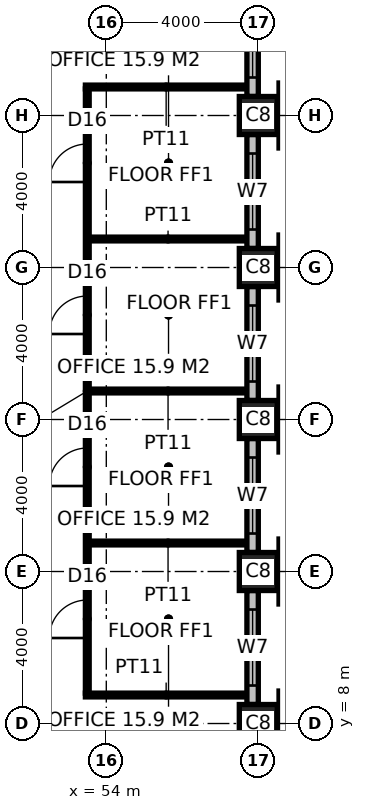
"""IFC4 building model, lengths in metres.
Left out: names, types, materials, properties, quantities, classifications, styles, units other than length and angle.
Written with IfcOpenShell. Run it as: python <this file> out.ifc"""

import sys

from ifc_helpers import new_model, si_unit, direction, frame, frame_2d, origin, origin_2d, place, context, subcontext, project, spatial, rectangle, hollow_rectangle, extrude, element, fill, save


model = new_model("IFC4")
c1 = context("Model", 3, precision=1e-05, world=origin(), true_north=direction((0.0, 1.0)))
c2 = subcontext(c1, "Body", "Model", "MODEL_VIEW")
j1 = project(units=[si_unit("LENGTHUNIT", "METRE"), si_unit("PLANEANGLEUNIT", "RADIAN")], contexts=[c1])
p1 = place(None, origin())
s1 = spatial("IfcSite", under=j1, at=p1, CompositionType="ELEMENT")
p2 = place(p1, origin())
s2 = spatial("IfcBuilding", under=s1, at=p2, CompositionType="ELEMENT")
p3 = place(p2, frame((0.0, 0.0, 133.4)))
s3 = spatial("IfcBuildingStorey", under=s2, at=p3, CompositionType="ELEMENT", Elevation=133.4)
for number, where, z_axis, x_axis in (
    (1, (58.0, 8.0, 0.0), (0.0, 0.0, 1.0), (1.0, 0.0, 0.0)),
    (2, (58.0, 12.0, 0.0), (0.0, 0.0, 1.0), (1.0, 0.0, 0.0)),
    (3, (58.0, 16.0, 0.0), (0.0, 0.0, 1.0), (1.0, 0.0, 0.0)),
    (4, (58.0, 20.0, 0.0), (0.0, 0.0, 1.0), (1.0, 0.0, 0.0)),
    (5, (58.0, 24.0, 0.0), (0.0, 0.0, 1.0), (1.0, 0.0, 0.0)),
):
    element("IfcColumn", number, at=place(p3, frame(where, z_axis=z_axis, x_axis=x_axis)), inside=s3, PredefinedType="COLUMN", context=c2, shape_type="SweptSolid", body=[
        extrude(hollow_rectangle(XDim=1.0, YDim=1.0, WallThickness=0.125, at=origin_2d()), origin(), (0.0, 0.0, 1.0), 4.0),
    ])
p4 = place(p3, frame((53.45, 8.75, 0.0), z_axis=(0.0, 0.0, 1.0), x_axis=(1.0, 0.0, 0.0)))
e6 = element("IfcWall", 6, at=p4, inside=s3, PredefinedType="PARTITIONING", context=c2, shape_type="SweptSolid", body=[
    extrude(rectangle(XDim=4.25, YDim=0.1, at=frame_2d((2.125, 0.0))), origin(), (0.0, 0.0, 1.0), 3.85),
])
for number, where, z_axis, x_axis in (
    (7, (53.55, 12.75, 0.0), (0.0, 0.0, 1.0), (1.0, 0.0, 0.0)),
    (8, (53.55, 16.75, 0.0), (0.0, 0.0, 1.0), (1.0, 0.0, 0.0)),
    (9, (53.55, 20.75, 0.0), (0.0, 0.0, 1.0), (1.0, 0.0, 0.0)),
):
    element("IfcWall", number, at=place(p3, frame(where, z_axis=z_axis, x_axis=x_axis)), inside=s3, PredefinedType="PARTITIONING", context=c2, shape_type="SweptSolid", body=[
        extrude(rectangle(XDim=4.15, YDim=0.1, at=frame_2d((2.075, 0.0))), origin(), (0.0, 0.0, 1.0), 3.85),
    ])
p5 = place(p3, frame((53.45, 24.75, 0.0), z_axis=(0.0, 0.0, 1.0), x_axis=(1.0, 0.0, 0.0)))
e10 = element("IfcWall", 10, at=p5, inside=s3, PredefinedType="PARTITIONING", context=c2, shape_type="SweptSolid", body=[
    extrude(rectangle(XDim=4.25, YDim=0.1, at=frame_2d((2.125, 0.0))), origin(), (0.0, 0.0, 1.0), 3.85),
])
p6 = place(p3, frame((53.5, 8.8, 0.0), z_axis=(0.0, 0.0, 1.0), x_axis=(0.0, 1.0, 0.0)))
e11 = element("IfcWall", 11, at=p6, inside=s3, PredefinedType="PARTITIONING", context=c2, shape_type="SweptSolid", body=[
    extrude(rectangle(XDim=15.9, YDim=0.1, at=frame_2d((7.95, 0.0))), origin(), (0.0, 0.0, 1.0), 3.85),
])
p7 = place(p6, frame((1.45, 0.0, 0.0)))
e12 = element("IfcOpeningElement", 12, at=p7, cuts=e11, PredefinedType="OPENING", context=c2, shape_type="SweptSolid", body=[
    extrude(rectangle(XDim=1.0, YDim=2.2, at=frame_2d((0.5, 1.1))), frame((0.0, 0.06, 0.0), z_axis=(0.0, -1.0, 0.0), x_axis=(1.0, 0.0, 0.0)), (0.0, 0.0, 1.0), 0.12),
])
p8 = place(p6, frame((5.45, 0.0, 0.0)))
e13 = element("IfcOpeningElement", 13, at=p8, cuts=e11, PredefinedType="OPENING", context=c2, shape_type="SweptSolid", body=[
    extrude(rectangle(XDim=1.0, YDim=2.2, at=frame_2d((0.5, 1.1))), frame((0.0, 0.06, 0.0), z_axis=(0.0, -1.0, 0.0), x_axis=(1.0, 0.0, 0.0)), (0.0, 0.0, 1.0), 0.12),
])
p9 = place(p6, frame((9.45, 0.0, 0.0)))
e14 = element("IfcOpeningElement", 14, at=p9, cuts=e11, PredefinedType="OPENING", context=c2, shape_type="SweptSolid", body=[
    extrude(rectangle(XDim=1.0, YDim=2.2, at=frame_2d((0.5, 1.1))), frame((0.0, 0.06, 0.0), z_axis=(0.0, -1.0, 0.0), x_axis=(1.0, 0.0, 0.0)), (0.0, 0.0, 1.0), 0.12),
])
p10 = place(p6, frame((13.45, 0.0, 0.0)))
e15 = element("IfcOpeningElement", 15, at=p10, cuts=e11, PredefinedType="OPENING", context=c2, shape_type="SweptSolid", body=[
    extrude(rectangle(XDim=1.0, YDim=2.2, at=frame_2d((0.5, 1.1))), frame((0.0, 0.06, 0.0), z_axis=(0.0, -1.0, 0.0), x_axis=(1.0, 0.0, 0.0)), (0.0, 0.0, 1.0), 0.12),
])
p11 = place(p3, frame((57.85, 8.5, 0.0), z_axis=(0.0, 0.0, 1.0), x_axis=(0.0, 1.0, 0.0)))
e16 = element("IfcWall", 16, at=p11, inside=s3, PredefinedType="ELEMENTEDWALL", context=c2, shape_type="SweptSolid", body=[
    extrude(rectangle(XDim=3.0, YDim=0.3, at=frame_2d((1.5, 0.0))), origin(), (0.0, 0.0, 1.0), 2.65),
])
p12 = place(p11, frame((0.5, 0.0, 0.8)))
e17 = element("IfcOpeningElement", 17, at=p12, cuts=e16, PredefinedType="OPENING", context=c2, shape_type="SweptSolid", body=[
    extrude(rectangle(XDim=2.0, YDim=1.8, at=frame_2d((1.0, 0.9))), frame((0.0, 0.16, 0.0), z_axis=(0.0, -1.0, 0.0), x_axis=(1.0, 0.0, 0.0)), (0.0, 0.0, 1.0), 0.32),
])
p13 = place(p3, frame((57.85, 12.5, 0.0), z_axis=(0.0, 0.0, 1.0), x_axis=(0.0, 1.0, 0.0)))
e18 = element("IfcWall", 18, at=p13, inside=s3, PredefinedType="ELEMENTEDWALL", context=c2, shape_type="SweptSolid", body=[
    extrude(rectangle(XDim=3.0, YDim=0.3, at=frame_2d((1.5, 0.0))), origin(), (0.0, 0.0, 1.0), 2.65),
])
p14 = place(p13, frame((0.5, 0.0, 0.8)))
e19 = element("IfcOpeningElement", 19, at=p14, cuts=e18, PredefinedType="OPENING", context=c2, shape_type="SweptSolid", body=[
    extrude(rectangle(XDim=2.0, YDim=1.8, at=frame_2d((1.0, 0.9))), frame((0.0, 0.16, 0.0), z_axis=(0.0, -1.0, 0.0), x_axis=(1.0, 0.0, 0.0)), (0.0, 0.0, 1.0), 0.32),
])
p15 = place(p3, frame((57.85, 16.5, 0.0), z_axis=(0.0, 0.0, 1.0), x_axis=(0.0, 1.0, 0.0)))
e20 = element("IfcWall", 20, at=p15, inside=s3, PredefinedType="ELEMENTEDWALL", context=c2, shape_type="SweptSolid", body=[
    extrude(rectangle(XDim=3.0, YDim=0.3, at=frame_2d((1.5, 0.0))), origin(), (0.0, 0.0, 1.0), 2.65),
])
p16 = place(p15, frame((0.5, 0.0, 0.8)))
e21 = element("IfcOpeningElement", 21, at=p16, cuts=e20, PredefinedType="OPENING", context=c2, shape_type="SweptSolid", body=[
    extrude(rectangle(XDim=2.0, YDim=1.8, at=frame_2d((1.0, 0.9))), frame((0.0, 0.16, 0.0), z_axis=(0.0, -1.0, 0.0), x_axis=(1.0, 0.0, 0.0)), (0.0, 0.0, 1.0), 0.32),
])
p17 = place(p3, frame((57.85, 20.5, 0.0), z_axis=(0.0, 0.0, 1.0), x_axis=(0.0, 1.0, 0.0)))
e22 = element("IfcWall", 22, at=p17, inside=s3, PredefinedType="ELEMENTEDWALL", context=c2, shape_type="SweptSolid", body=[
    extrude(rectangle(XDim=3.0, YDim=0.3, at=frame_2d((1.5, 0.0))), origin(), (0.0, 0.0, 1.0), 2.65),
])
p18 = place(p17, frame((0.5, 0.0, 0.8)))
e23 = element("IfcOpeningElement", 23, at=p18, cuts=e22, PredefinedType="OPENING", context=c2, shape_type="SweptSolid", body=[
    extrude(rectangle(XDim=2.0, YDim=1.8, at=frame_2d((1.0, 0.9))), frame((0.0, 0.16, 0.0), z_axis=(0.0, -1.0, 0.0), x_axis=(1.0, 0.0, 0.0)), (0.0, 0.0, 1.0), 0.32),
])
p19 = place(p3, frame((57.85, 24.5, 0.0), z_axis=(0.0, 0.0, 1.0), x_axis=(0.0, 1.0, 0.0)))
e24 = element("IfcWall", 24, at=p19, inside=s3, PredefinedType="ELEMENTEDWALL", context=c2, shape_type="SweptSolid", body=[
    extrude(rectangle(XDim=3.0, YDim=0.3, at=frame_2d((1.5, 0.0))), origin(), (0.0, 0.0, 1.0), 2.65),
])
p20 = place(p19, frame((0.5, 0.0, 0.8)))
e25 = element("IfcOpeningElement", 25, at=p20, cuts=e24, PredefinedType="OPENING", context=c2, shape_type="SweptSolid", body=[
    extrude(rectangle(XDim=2.0, YDim=1.8, at=frame_2d((1.0, 0.9))), frame((0.0, 0.16, 0.0), z_axis=(0.0, -1.0, 0.0), x_axis=(1.0, 0.0, 0.0)), (0.0, 0.0, 1.0), 0.32),
])
p21 = place(p7, origin())
e26 = element("IfcDoor", 26, at=p21, inside=s3, OperationType="SINGLE_SWING_LEFT", PredefinedType="DOOR", context=c2, shape_type="SweptSolid", body=[
    extrude(rectangle(XDim=1.0, YDim=2.2, at=frame_2d((0.5, 1.1))), frame((0.0, 0.025, 0.0), z_axis=(0.0, -1.0, 0.0), x_axis=(1.0, 0.0, 0.0)), (0.0, 0.0, 1.0), 0.05),
])
fill(e12, e26)
p22 = place(p8, origin())
e27 = element("IfcDoor", 27, at=p22, inside=s3, OperationType="SINGLE_SWING_LEFT", PredefinedType="DOOR", context=c2, shape_type="SweptSolid", body=[
    extrude(rectangle(XDim=1.0, YDim=2.2, at=frame_2d((0.5, 1.1))), frame((0.0, 0.025, 0.0), z_axis=(0.0, -1.0, 0.0), x_axis=(1.0, 0.0, 0.0)), (0.0, 0.0, 1.0), 0.05),
])
fill(e13, e27)
p23 = place(p9, origin())
e28 = element("IfcDoor", 28, at=p23, inside=s3, OperationType="SINGLE_SWING_LEFT", PredefinedType="DOOR", context=c2, shape_type="SweptSolid", body=[
    extrude(rectangle(XDim=1.0, YDim=2.2, at=frame_2d((0.5, 1.1))), frame((0.0, 0.025, 0.0), z_axis=(0.0, -1.0, 0.0), x_axis=(1.0, 0.0, 0.0)), (0.0, 0.0, 1.0), 0.05),
])
fill(e14, e28)
p24 = place(p10, origin())
e29 = element("IfcDoor", 29, at=p24, inside=s3, OperationType="SINGLE_SWING_LEFT", PredefinedType="DOOR", context=c2, shape_type="SweptSolid", body=[
    extrude(rectangle(XDim=1.0, YDim=2.2, at=frame_2d((0.5, 1.1))), frame((0.0, 0.025, 0.0), z_axis=(0.0, -1.0, 0.0), x_axis=(1.0, 0.0, 0.0)), (0.0, 0.0, 1.0), 0.05),
])
fill(e15, e29)
p25 = place(p12, origin())
e30 = element("IfcWindow", 30, at=p25, inside=s3, PartitioningType="SINGLE_PANEL", PredefinedType="WINDOW", context=c2, shape_type="SweptSolid", body=[
    extrude(rectangle(XDim=2.0, YDim=1.8, at=frame_2d((1.0, 0.9))), frame((0.0, 0.03, 0.0), z_axis=(0.0, -1.0, 0.0), x_axis=(1.0, 0.0, 0.0)), (0.0, 0.0, 1.0), 0.06),
])
fill(e17, e30)
p26 = place(p14, origin())
e31 = element("IfcWindow", 31, at=p26, inside=s3, PartitioningType="SINGLE_PANEL", PredefinedType="WINDOW", context=c2, shape_type="SweptSolid", body=[
    extrude(rectangle(XDim=2.0, YDim=1.8, at=frame_2d((1.0, 0.9))), frame((0.0, 0.03, 0.0), z_axis=(0.0, -1.0, 0.0), x_axis=(1.0, 0.0, 0.0)), (0.0, 0.0, 1.0), 0.06),
])
fill(e19, e31)
p27 = place(p16, origin())
e32 = element("IfcWindow", 32, at=p27, inside=s3, PartitioningType="SINGLE_PANEL", PredefinedType="WINDOW", context=c2, shape_type="SweptSolid", body=[
    extrude(rectangle(XDim=2.0, YDim=1.8, at=frame_2d((1.0, 0.9))), frame((0.0, 0.03, 0.0), z_axis=(0.0, -1.0, 0.0), x_axis=(1.0, 0.0, 0.0)), (0.0, 0.0, 1.0), 0.06),
])
fill(e21, e32)
p28 = place(p18, origin())
e33 = element("IfcWindow", 33, at=p28, inside=s3, PartitioningType="SINGLE_PANEL", PredefinedType="WINDOW", context=c2, shape_type="SweptSolid", body=[
    extrude(rectangle(XDim=2.0, YDim=1.8, at=frame_2d((1.0, 0.9))), frame((0.0, 0.03, 0.0), z_axis=(0.0, -1.0, 0.0), x_axis=(1.0, 0.0, 0.0)), (0.0, 0.0, 1.0), 0.06),
])
fill(e23, e33)
p29 = place(p20, origin())
e34 = element("IfcWindow", 34, at=p29, inside=s3, PartitioningType="SINGLE_PANEL", PredefinedType="WINDOW", context=c2, shape_type="SweptSolid", body=[
    extrude(rectangle(XDim=2.0, YDim=1.8, at=frame_2d((1.0, 0.9))), frame((0.0, 0.03, 0.0), z_axis=(0.0, -1.0, 0.0), x_axis=(1.0, 0.0, 0.0)), (0.0, 0.0, 1.0), 0.06),
])
fill(e25, e34)
save(model, sys.argv[1])
